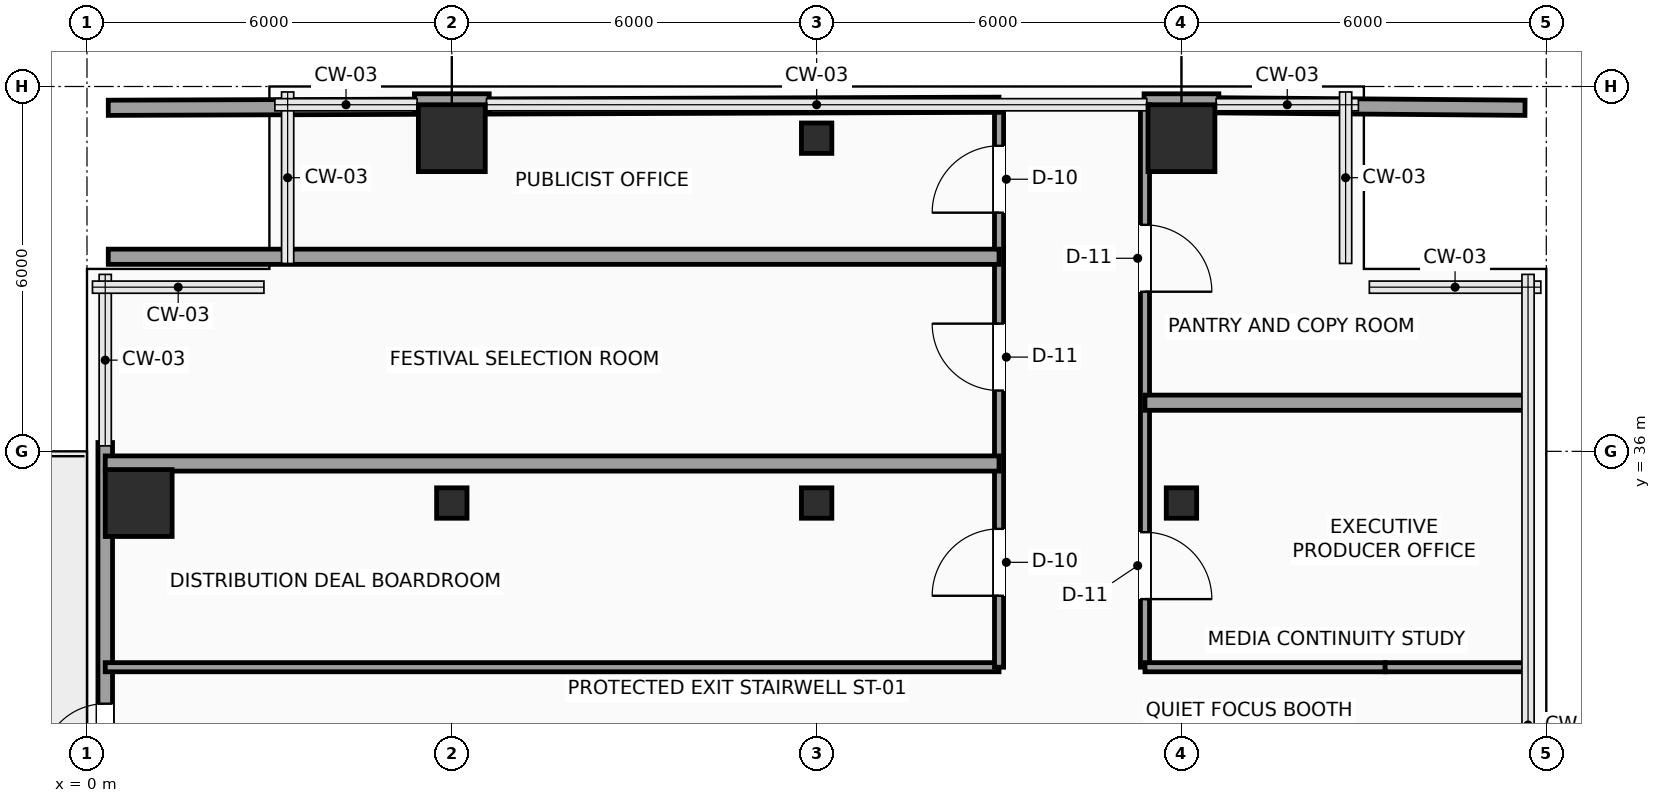
"""IFC4 building model, lengths in metres.
Left out: names, types, materials, properties, quantities, classifications, styles, units other than length and angle.
Written with IfcOpenShell. Run it as: python <this file> out.ifc"""

import sys

from ifc_helpers import new_model, si_unit, direction, frame, frame_2d, origin, origin_2d, place, context, subcontext, project, spatial, rectangle, hollow_rectangle, extrude, element, fill, save


model = new_model("IFC4")
c1 = context("Model", 3, precision=1e-05, world=origin(), true_north=direction((0.0, 1.0)))
c2 = subcontext(c1, "Body", "Model", "MODEL_VIEW")
j1 = project(units=[si_unit("LENGTHUNIT", "METRE"), si_unit("PLANEANGLEUNIT", "RADIAN")], contexts=[c1])
p1 = place(None, origin())
s1 = spatial("IfcSite", under=j1, at=p1, CompositionType="ELEMENT")
p2 = place(p1, origin())
s2 = spatial("IfcBuilding", under=s1, at=p2, CompositionType="ELEMENT")
p3 = place(p2, frame((0.0, 0.0, 134.4)))
s3 = spatial("IfcBuildingStorey", under=s2, at=p3, CompositionType="ELEMENT", Elevation=134.4)
p4 = place(p3, frame((0.85, 35.15, 0.0), z_axis=(0.0, 0.0, 1.0), x_axis=(1.0, 0.0, 0.0)))
e1 = element("IfcColumn", 1, at=p4, inside=s3, PredefinedType="COLUMN", context=c2, shape_type="SweptSolid", body=[
    extrude(rectangle(XDim=1.1, YDim=1.1, at=origin_2d()), origin(), (0.0, 0.0, 1.0), 3.75),
])
p5 = place(p3, frame((6.0, 35.15, 0.0), z_axis=(0.0, 0.0, 1.0), x_axis=(1.0, 0.0, 0.0)))
e2 = element("IfcColumn", 2, at=p5, inside=s3, PredefinedType="COLUMN", context=c2, shape_type="SweptSolid", body=[
    extrude(hollow_rectangle(XDim=0.5, YDim=0.5, WallThickness=0.025, InnerFilletRadius=0.025, OuterFilletRadius=0.04, at=origin_2d()), origin(), (0.0, 0.0, 1.0), 3.75),
])
p6 = place(p3, frame((6.0, 41.15, 0.0), z_axis=(0.0, 0.0, 1.0), x_axis=(1.0, 0.0, 0.0)))
e3 = element("IfcColumn", 3, at=p6, inside=s3, PredefinedType="COLUMN", context=c2, shape_type="SweptSolid", body=[
    extrude(rectangle(XDim=1.1, YDim=1.1, at=origin_2d()), origin(), (0.0, 0.0, 1.0), 3.75),
])
for number, where, z_axis, x_axis in (
    (4, (12.0, 35.15, 0.0), (0.0, 0.0, 1.0), (1.0, 0.0, 0.0)),
    (5, (12.0, 41.15, 0.0), (0.0, 0.0, 1.0), (1.0, 0.0, 0.0)),
    (6, (18.0, 35.15, 0.0), (0.0, 0.0, 1.0), (1.0, 0.0, 0.0)),
):
    element("IfcColumn", number, at=place(p3, frame(where, z_axis=z_axis, x_axis=x_axis)), inside=s3, PredefinedType="COLUMN", context=c2, shape_type="SweptSolid", body=[
        extrude(hollow_rectangle(XDim=0.5, YDim=0.5, WallThickness=0.025, InnerFilletRadius=0.025, OuterFilletRadius=0.04, at=origin_2d()), origin(), (0.0, 0.0, 1.0), 3.75),
    ])
p7 = place(p3, frame((18.0, 41.15, 0.0), z_axis=(0.0, 0.0, 1.0), x_axis=(1.0, 0.0, 0.0)))
e7 = element("IfcColumn", 7, at=p7, inside=s3, PredefinedType="COLUMN", context=c2, shape_type="SweptSolid", body=[
    extrude(rectangle(XDim=1.1, YDim=1.1, at=origin_2d()), origin(), (0.0, 0.0, 1.0), 3.75),
])
p8 = place(p3, frame((0.3, 26.855, 0.0), z_axis=(0.0, 0.0, 1.0), x_axis=(0.0, 1.0, 0.0)))
e8 = element("IfcWall", 8, at=p8, inside=s3, PredefinedType="SOLIDWALL", context=c2, shape_type="SweptSolid", body=[
    extrude(rectangle(XDim=9.29, YDim=0.24, at=frame_2d((4.645, 0.0))), origin(), (0.0, 0.0, 1.0), 3.525),
])
p9 = place(p8, frame((3.945, 0.0, 0.0)))
e9 = element("IfcOpeningElement", 9, at=p9, cuts=e8, PredefinedType="OPENING", context=c2, shape_type="SweptSolid", body=[
    extrude(rectangle(XDim=1.05, YDim=2.2, at=frame_2d((0.525, 1.1))), frame((0.0, 0.13, 0.0), z_axis=(0.0, -1.0, 0.0), x_axis=(1.0, 0.0, 0.0)), (0.0, 0.0, 1.0), 0.26),
])
for number, where, z_axis, x_axis in (
    (10, (5.385, 41.76, 0.0), (0.0, 0.0, 1.0), (1.0, 0.0, 0.0)),
    (11, (17.385, 41.76, 0.0), (0.0, 0.0, 1.0), (1.0, 0.0, 0.0)),
):
    element("IfcWall", number, at=place(p3, frame(where, z_axis=z_axis, x_axis=x_axis)), inside=s3, PredefinedType="SOLIDWALL", context=c2, shape_type="SweptSolid", body=[
        extrude(rectangle(XDim=1.23, YDim=0.24, at=frame_2d((0.615, 0.0))), origin(), (0.0, 0.0, 1.0), 3.525),
    ])
p10 = place(p3, frame((0.3, 32.45, 0.0), z_axis=(0.0, 0.0, 1.0), x_axis=(1.0, 0.0, 0.0)))
e12 = element("IfcWall", 12, at=p10, inside=s3, PredefinedType="PARTITIONING", context=c2, shape_type="SweptSolid", body=[
    extrude(rectangle(XDim=14.7, YDim=0.15, at=frame_2d((7.35, 0.0))), origin(), (0.0, 0.0, 1.0), 3.525),
])
p11 = place(p3, frame((15.0, 32.45, 0.0), z_axis=(0.0, 0.0, 1.0), x_axis=(0.0, 1.0, 0.0)))
e13 = element("IfcWall", 13, at=p11, inside=s3, PredefinedType="PARTITIONING", context=c2, shape_type="SweptSolid", body=[
    extrude(rectangle(XDim=9.25, YDim=0.15, at=frame_2d((4.625, 0.0))), origin(), (0.0, 0.0, 1.0), 3.525),
])
p12 = place(p11, frame((1.175, 0.0, 0.0)))
e14 = element("IfcOpeningElement", 14, at=p12, cuts=e13, PredefinedType="OPENING", context=c2, shape_type="SweptSolid", body=[
    extrude(rectangle(XDim=1.1, YDim=2.25, at=frame_2d((0.55, 1.125))), frame((0.0, 0.085, 0.0), z_axis=(0.0, -1.0, 0.0), x_axis=(1.0, 0.0, 0.0)), (0.0, 0.0, 1.0), 0.17),
])
p13 = place(p11, frame((4.55, 0.0, 0.0)))
e15 = element("IfcOpeningElement", 15, at=p13, cuts=e13, PredefinedType="OPENING", context=c2, shape_type="SweptSolid", body=[
    extrude(rectangle(XDim=1.1, YDim=2.25, at=frame_2d((0.55, 1.125))), frame((0.0, 0.085, 0.0), z_axis=(0.0, -1.0, 0.0), x_axis=(1.0, 0.0, 0.0)), (0.0, 0.0, 1.0), 0.17),
])
p14 = place(p11, frame((7.475, 0.0, 0.0)))
e16 = element("IfcOpeningElement", 16, at=p14, cuts=e13, PredefinedType="OPENING", context=c2, shape_type="SweptSolid", body=[
    extrude(rectangle(XDim=1.1, YDim=2.25, at=frame_2d((0.55, 1.125))), frame((0.0, 0.085, 0.0), z_axis=(0.0, -1.0, 0.0), x_axis=(1.0, 0.0, 0.0)), (0.0, 0.0, 1.0), 0.17),
])
p15 = place(p3, frame((17.4, 41.7, 0.0), z_axis=(0.0, 0.0, 1.0), x_axis=(0.0, -1.0, 0.0)))
e17 = element("IfcWall", 17, at=p15, inside=s3, PredefinedType="PARTITIONING", context=c2, shape_type="SweptSolid", body=[
    extrude(rectangle(XDim=9.25, YDim=0.15, at=frame_2d((4.625, 0.0))), origin(), (0.0, 0.0, 1.0), 3.525),
])
p16 = place(p15, frame((7.03, 0.0, 0.0)))
e18 = element("IfcOpeningElement", 18, at=p16, cuts=e17, PredefinedType="OPENING", context=c2, shape_type="SweptSolid", body=[
    extrude(rectangle(XDim=1.1, YDim=2.25, at=frame_2d((0.55, 1.125))), frame((0.0, 0.085, 0.0), z_axis=(0.0, -1.0, 0.0), x_axis=(1.0, 0.0, 0.0)), (0.0, 0.0, 1.0), 0.17),
])
p17 = place(p15, frame((1.975, 0.0, 0.0)))
e19 = element("IfcOpeningElement", 19, at=p17, cuts=e17, PredefinedType="OPENING", context=c2, shape_type="SweptSolid", body=[
    extrude(rectangle(XDim=1.1, YDim=2.25, at=frame_2d((0.55, 1.125))), frame((0.0, 0.085, 0.0), z_axis=(0.0, -1.0, 0.0), x_axis=(1.0, 0.0, 0.0)), (0.0, 0.0, 1.0), 0.17),
])
p18 = place(p3, frame((17.4, 32.45, 0.0), z_axis=(0.0, 0.0, 1.0), x_axis=(1.0, 0.0, 0.0)))
e20 = element("IfcWall", 20, at=p18, inside=s3, PredefinedType="PARTITIONING", context=c2, shape_type="SweptSolid", body=[
    extrude(rectangle(XDim=3.95, YDim=0.15, at=frame_2d((1.975, 0.0))), origin(), (0.0, 0.0, 1.0), 3.525),
])
p19 = place(p3, frame((21.35, 32.45, 0.0), z_axis=(0.0, 0.0, 1.0), x_axis=(1.0, 0.0, 0.0)))
e21 = element("IfcWall", 21, at=p19, inside=s3, PredefinedType="PARTITIONING", context=c2, shape_type="SweptSolid", body=[
    extrude(rectangle(XDim=2.35, YDim=0.15, at=frame_2d((1.175, 0.0))), origin(), (0.0, 0.0, 1.0), 3.525),
])
p20 = place(p3, frame((0.3, 35.8, 0.0), z_axis=(0.0, 0.0, 1.0), x_axis=(1.0, 0.0, 0.0)))
e22 = element("IfcWall", 22, at=p20, inside=s3, PredefinedType="PARTITIONING", context=c2, shape_type="SweptSolid", body=[
    extrude(rectangle(XDim=14.7, YDim=0.25, at=frame_2d((7.35, 0.0))), origin(), (0.0, 0.0, 1.0), 3.525),
])
p21 = place(p3, frame((0.35, 39.2, 0.0), z_axis=(0.0, 0.0, 1.0), x_axis=(1.0, 0.0, 0.0)))
e23 = element("IfcWall", 23, at=p21, inside=s3, PredefinedType="PARTITIONING", context=c2, shape_type="SweptSolid", body=[
    extrude(rectangle(XDim=14.65, YDim=0.25, at=frame_2d((7.325, 0.0))), origin(), (0.0, 0.0, 1.0), 3.525),
])
p22 = place(p3, frame((0.35, 41.65, 0.0), z_axis=(0.0, 0.0, 1.0), x_axis=(0.999994073761, 0.003442737683, 0.0)))
e24 = element("IfcWall", 24, at=p22, inside=s3, PredefinedType="PARTITIONING", context=c2, shape_type="SweptSolid", body=[
    extrude(rectangle(XDim=5.035, YDim=0.25, at=frame_2d((2.518, 0.0))), origin(), (0.0, 0.0, 1.0), 3.525),
])
p23 = place(p3, frame((6.615, 41.671, 0.0), z_axis=(0.0, 0.0, 1.0), x_axis=(0.999994197557, 0.003406589638, 0.0)))
e25 = element("IfcWall", 25, at=p23, inside=s3, PredefinedType="PARTITIONING", context=c2, shape_type="SweptSolid", body=[
    extrude(rectangle(XDim=8.385, YDim=0.25, at=frame_2d((4.192, 0.0))), origin(), (0.0, 0.0, 1.0), 3.525),
])
p24 = place(p3, frame((17.4, 36.8, 0.0), z_axis=(0.0, 0.0, 1.0), x_axis=(1.0, 0.0, 0.0)))
e26 = element("IfcWall", 26, at=p24, inside=s3, PredefinedType="PARTITIONING", context=c2, shape_type="SweptSolid", body=[
    extrude(rectangle(XDim=6.3, YDim=0.25, at=frame_2d((3.15, 0.0))), origin(), (0.0, 0.0, 1.0), 3.525),
])
p25 = place(p3, frame((18.615, 41.69, 0.0), z_axis=(0.0, 0.0, 1.0), x_axis=(0.99996799533, -0.008000519771, 0.0)))
e27 = element("IfcWall", 27, at=p25, inside=s3, PredefinedType="PARTITIONING", context=c2, shape_type="SweptSolid", body=[
    extrude(rectangle(XDim=5.035, YDim=0.25, at=frame_2d((2.518, 0.0))), origin(), (0.0, 0.0, 1.0), 3.525),
])
p26 = place(p9, origin())
e28 = element("IfcDoor", 28, at=p26, inside=s3, OperationType="SINGLE_SWING_LEFT", PredefinedType="DOOR", context=c2, shape_type="SweptSolid", body=[
    extrude(rectangle(XDim=1.05, YDim=2.2, at=frame_2d((0.525, 1.1))), frame((0.0, 0.025, 0.0), z_axis=(0.0, -1.0, 0.0), x_axis=(1.0, 0.0, 0.0)), (0.0, 0.0, 1.0), 0.05),
])
fill(e9, e28)
p27 = place(p12, origin())
e29 = element("IfcDoor", 29, at=p27, inside=s3, OperationType="SINGLE_SWING_LEFT", PredefinedType="DOOR", context=c2, shape_type="SweptSolid", body=[
    extrude(rectangle(XDim=1.1, YDim=2.25, at=frame_2d((0.55, 1.125))), frame((0.0, 0.025, 0.0), z_axis=(0.0, -1.0, 0.0), x_axis=(1.0, 0.0, 0.0)), (0.0, 0.0, 1.0), 0.05),
])
fill(e14, e29)
p28 = place(p13, origin())
e30 = element("IfcDoor", 30, at=p28, inside=s3, OperationType="SINGLE_SWING_RIGHT", PredefinedType="DOOR", context=c2, shape_type="SweptSolid", body=[
    extrude(rectangle(XDim=1.1, YDim=2.25, at=frame_2d((0.55, 1.125))), frame((0.0, 0.025, 0.0), z_axis=(0.0, -1.0, 0.0), x_axis=(1.0, 0.0, 0.0)), (0.0, 0.0, 1.0), 0.05),
])
fill(e15, e30)
p29 = place(p14, origin())
e31 = element("IfcDoor", 31, at=p29, inside=s3, OperationType="SINGLE_SWING_LEFT", PredefinedType="DOOR", context=c2, shape_type="SweptSolid", body=[
    extrude(rectangle(XDim=1.1, YDim=2.25, at=frame_2d((0.55, 1.125))), frame((0.0, 0.025, 0.0), z_axis=(0.0, -1.0, 0.0), x_axis=(1.0, 0.0, 0.0)), (0.0, 0.0, 1.0), 0.05),
])
fill(e16, e31)
p30 = place(p16, origin())
e32 = element("IfcDoor", 32, at=p30, inside=s3, OperationType="SINGLE_SWING_RIGHT", PredefinedType="DOOR", context=c2, shape_type="SweptSolid", body=[
    extrude(rectangle(XDim=1.1, YDim=2.25, at=frame_2d((0.55, 1.125))), frame((0.0, 0.025, 0.0), z_axis=(0.0, -1.0, 0.0), x_axis=(1.0, 0.0, 0.0)), (0.0, 0.0, 1.0), 0.05),
])
fill(e18, e32)
p31 = place(p17, origin())
e33 = element("IfcDoor", 33, at=p31, inside=s3, OperationType="SINGLE_SWING_RIGHT", PredefinedType="DOOR", context=c2, shape_type="SweptSolid", body=[
    extrude(rectangle(XDim=1.1, YDim=2.25, at=frame_2d((0.55, 1.125))), frame((0.0, 0.025, 0.0), z_axis=(0.0, -1.0, 0.0), x_axis=(1.0, 0.0, 0.0)), (0.0, 0.0, 1.0), 0.05),
])
fill(e19, e33)
save(model, sys.argv[1])
